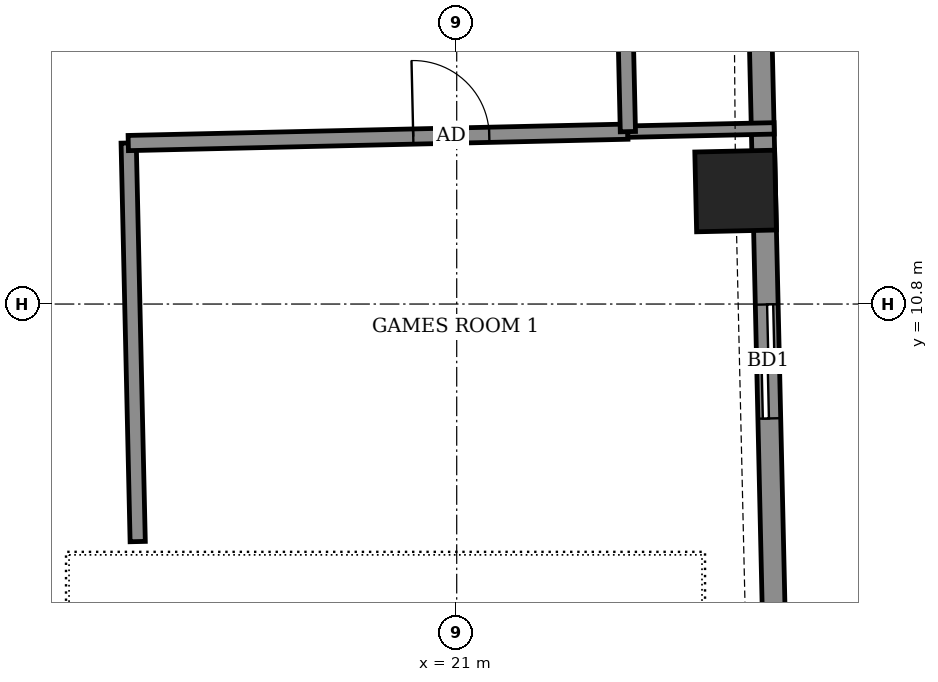
"""IFC4 building model, lengths in metres.
Left out: names, types, materials, properties, quantities, classifications, styles, units other than length and angle.
Written with IfcOpenShell. Run it as: python <this file> out.ifc"""

import sys

from ifc_helpers import new_model, si_unit, direction, frame, frame_2d, origin, origin_2d, place, context, subcontext, project, spatial, rectangle, extrude, element, fill, save


model = new_model("IFC4")
c1 = context("Model", 3, precision=1e-05, world=origin(), true_north=direction((0.0, 1.0)))
c2 = subcontext(c1, "Body", "Model", "MODEL_VIEW")
j1 = project(units=[si_unit("LENGTHUNIT", "METRE"), si_unit("PLANEANGLEUNIT", "RADIAN")], contexts=[c1])
p1 = place(None, origin())
s1 = spatial("IfcSite", under=j1, at=p1, CompositionType="ELEMENT")
p2 = place(p1, origin())
s2 = spatial("IfcBuilding", under=s1, at=p2, CompositionType="ELEMENT")
p3 = place(p2, frame((0.0, 0.0, 249.1)))
s3 = spatial("IfcBuildingStorey", under=s2, at=p3, CompositionType="ELEMENT", Elevation=249.1)
p4 = place(p3, frame((24.669, 12.287, -0.55), z_axis=(0.0, 0.0, 1.0), x_axis=(-0.022668680801, 0.999743032439, 0.0)))
e1 = element("IfcColumn", 1, at=p4, inside=s3, PredefinedType="COLUMN", context=c2, shape_type="SweptSolid", body=[
    extrude(rectangle(XDim=1.05, YDim=1.05, at=origin_2d()), origin(), (0.0, 0.0, 1.0), 3.6),
])
p5 = place(p3, frame((25.203, 5.31, 0.0), z_axis=(0.0, 0.0, 1.0), x_axis=(-0.022708061432, 0.999742138727, 0.0)))
e2 = element("IfcWall", 2, at=p5, inside=s3, PredefinedType="SOLIDWALL", context=c2, shape_type="SweptSolid", body=[
    extrude(rectangle(XDim=13.299, YDim=0.3, at=frame_2d((6.65, 0.0))), origin(), (0.0, 0.0, 1.0), 2.55),
])
p6 = place(p5, frame((3.986, 0.0, 0.0)))
e3 = element("IfcOpeningElement", 3, at=p6, cuts=e2, PredefinedType="OPENING", context=c2, shape_type="SweptSolid", body=[
    extrude(rectangle(XDim=1.5, YDim=2.4, at=frame_2d((0.75, 1.2))), frame((0.0, 0.16, 0.0), z_axis=(0.0, -1.0, 0.0), x_axis=(1.0, 0.0, 0.0)), (0.0, 0.0, 1.0), 0.32),
])
p7 = place(p5, frame((9.013, 0.0, 0.9)))
e4 = element("IfcOpeningElement", 4, at=p7, cuts=e2, PredefinedType="OPENING", context=c2, shape_type="SweptSolid", body=[
    extrude(rectangle(XDim=2.4, YDim=1.5, at=frame_2d((1.2, 0.75))), frame((0.0, 0.16, 0.0), z_axis=(0.0, -1.0, 0.0), x_axis=(1.0, 0.0, 0.0)), (0.0, 0.0, 1.0), 0.32),
])
p8 = place(p3, frame((16.803, 7.675, 0.0), z_axis=(0.0, 0.0, 1.0), x_axis=(-0.022667483124, 0.999743059595, 0.0)))
e5 = element("IfcWall", 5, at=p8, inside=s3, PredefinedType="PARTITIONING", context=c2, shape_type="SweptSolid", body=[
    extrude(rectangle(XDim=5.245, YDim=0.2, at=frame_2d((2.623, 0.0))), origin(), (0.0, 0.0, 1.0), 3.05),
])
p9 = place(p3, frame((16.679, 12.918, 0.0), z_axis=(0.0, 0.0, 1.0), x_axis=(0.999739125025, 0.022840356696, 0.0)))
e6 = element("IfcWall", 6, at=p9, inside=s3, PredefinedType="PARTITIONING", context=c2, shape_type="SweptSolid", body=[
    extrude(rectangle(XDim=6.574, YDim=0.2, at=frame_2d((3.287, 0.0))), origin(), (0.0, 0.0, 1.0), 3.05),
])
p10 = place(p9, frame((3.75, 0.0, 0.0)))
e7 = element("IfcOpeningElement", 7, at=p10, cuts=e6, PredefinedType="OPENING", context=c2, shape_type="SweptSolid", body=[
    extrude(rectangle(XDim=1.0, YDim=2.1, at=frame_2d((0.5, 1.05))), frame((0.0, 0.11, 0.0), z_axis=(0.0, -1.0, 0.0), x_axis=(1.0, 0.0, 0.0)), (0.0, 0.0, 1.0), 0.22),
])
p11 = place(p3, frame((23.251, 13.068, 0.0), z_axis=(0.0, 0.0, 1.0), x_axis=(0.999750982596, 0.022315304114, 0.0)))
e8 = element("IfcWall", 8, at=p11, inside=s3, PredefinedType="PARTITIONING", context=c2, shape_type="SweptSolid", body=[
    extrude(rectangle(XDim=1.926, YDim=0.15, at=frame_2d((0.963, 0.0))), origin(), (0.0, 0.0, 1.0), 2.55),
])
p12 = place(p3, frame((23.252, 13.068, 0.0), z_axis=(0.0, 0.0, 1.0), x_axis=(-0.022636322434, 0.999743765625, 0.0)))
e9 = element("IfcWall", 9, at=p12, inside=s3, PredefinedType="PARTITIONING", context=c2, shape_type="SweptSolid", body=[
    extrude(rectangle(XDim=1.499, YDim=0.2, at=frame_2d((0.75, 0.0))), origin(), (0.0, 0.0, 1.0), 3.05),
])
p13 = place(p3, frame((-27.652, 13.413, 0.0), z_axis=(0.0, 0.0, 1.0), x_axis=(0.999742864992, 0.022676064408, 0.0)))
e10 = element("IfcWall", 10, at=p13, inside=s3, PredefinedType="PARTITIONING", context=c2, shape_type="SweptSolid", body=[
    extrude(rectangle(XDim=50.882, YDim=0.2, at=frame_2d((25.441, 0.0))), origin(), (0.0, 0.0, 1.0), 3.05),
])
p14 = place(p13, frame((47.801, 0.0, 0.0)))
e11 = element("IfcOpeningElement", 11, at=p14, cuts=e10, PredefinedType="OPENING", context=c2, shape_type="SweptSolid", body=[
    extrude(rectangle(XDim=1.0, YDim=2.1, at=frame_2d((0.5, 1.05))), frame((0.0, 0.11, 0.0), z_axis=(0.0, -1.0, 0.0), x_axis=(1.0, 0.0, 0.0)), (0.0, 0.0, 1.0), 0.22),
])
p15 = place(p13, frame((43.425, 0.0, 0.0)))
e12 = element("IfcOpeningElement", 12, at=p15, cuts=e10, PredefinedType="OPENING", context=c2, shape_type="SweptSolid", body=[
    extrude(rectangle(XDim=0.9, YDim=2.1, at=frame_2d((0.45, 1.05))), frame((0.0, 0.11, 0.0), z_axis=(0.0, -1.0, 0.0), x_axis=(1.0, 0.0, 0.0)), (0.0, 0.0, 1.0), 0.22),
])
p16 = place(p13, frame((36.8, 0.0, 0.0)))
e13 = element("IfcOpeningElement", 13, at=p16, cuts=e10, PredefinedType="OPENING", context=c2, shape_type="SweptSolid", body=[
    extrude(rectangle(XDim=0.9, YDim=2.1, at=frame_2d((0.45, 1.05))), frame((0.0, 0.11, 0.0), z_axis=(0.0, -1.0, 0.0), x_axis=(1.0, 0.0, 0.0)), (0.0, 0.0, 1.0), 0.22),
])
p17 = place(p13, frame((34.975, 0.0, 0.0)))
e14 = element("IfcOpeningElement", 14, at=p17, cuts=e10, PredefinedType="OPENING", context=c2, shape_type="SweptSolid", body=[
    extrude(rectangle(XDim=0.9, YDim=2.1, at=frame_2d((0.45, 1.05))), frame((0.0, 0.11, 0.0), z_axis=(0.0, -1.0, 0.0), x_axis=(1.0, 0.0, 0.0)), (0.0, 0.0, 1.0), 0.22),
])
p18 = place(p13, frame((28.325, 0.0, 0.0)))
e15 = element("IfcOpeningElement", 15, at=p18, cuts=e10, PredefinedType="OPENING", context=c2, shape_type="SweptSolid", body=[
    extrude(rectangle(XDim=0.9, YDim=2.1, at=frame_2d((0.45, 1.05))), frame((0.0, 0.11, 0.0), z_axis=(0.0, -1.0, 0.0), x_axis=(1.0, 0.0, 0.0)), (0.0, 0.0, 1.0), 0.22),
])
p19 = place(p13, frame((26.475, 0.0, 0.0)))
e16 = element("IfcOpeningElement", 16, at=p19, cuts=e10, PredefinedType="OPENING", context=c2, shape_type="SweptSolid", body=[
    extrude(rectangle(XDim=0.9, YDim=2.1, at=frame_2d((0.45, 1.05))), frame((0.0, 0.11, 0.0), z_axis=(0.0, -1.0, 0.0), x_axis=(1.0, 0.0, 0.0)), (0.0, 0.0, 1.0), 0.22),
])
p20 = place(p13, frame((19.825, 0.0, 0.0)))
e17 = element("IfcOpeningElement", 17, at=p20, cuts=e10, PredefinedType="OPENING", context=c2, shape_type="SweptSolid", body=[
    extrude(rectangle(XDim=0.9, YDim=2.1, at=frame_2d((0.45, 1.05))), frame((0.0, 0.11, 0.0), z_axis=(0.0, -1.0, 0.0), x_axis=(1.0, 0.0, 0.0)), (0.0, 0.0, 1.0), 0.22),
])
p21 = place(p13, frame((17.975, 0.0, 0.0)))
e18 = element("IfcOpeningElement", 18, at=p21, cuts=e10, PredefinedType="OPENING", context=c2, shape_type="SweptSolid", body=[
    extrude(rectangle(XDim=0.9, YDim=2.1, at=frame_2d((0.45, 1.05))), frame((0.0, 0.11, 0.0), z_axis=(0.0, -1.0, 0.0), x_axis=(1.0, 0.0, 0.0)), (0.0, 0.0, 1.0), 0.22),
])
p22 = place(p13, frame((11.325, 0.0, 0.0)))
e19 = element("IfcOpeningElement", 19, at=p22, cuts=e10, PredefinedType="OPENING", context=c2, shape_type="SweptSolid", body=[
    extrude(rectangle(XDim=0.9, YDim=2.1, at=frame_2d((0.45, 1.05))), frame((0.0, 0.11, 0.0), z_axis=(0.0, -1.0, 0.0), x_axis=(1.0, 0.0, 0.0)), (0.0, 0.0, 1.0), 0.22),
])
p23 = place(p13, frame((9.475, 0.0, 0.0)))
e20 = element("IfcOpeningElement", 20, at=p23, cuts=e10, PredefinedType="OPENING", context=c2, shape_type="SweptSolid", body=[
    extrude(rectangle(XDim=0.9, YDim=2.1, at=frame_2d((0.45, 1.05))), frame((0.0, 0.11, 0.0), z_axis=(0.0, -1.0, 0.0), x_axis=(1.0, 0.0, 0.0)), (0.0, 0.0, 1.0), 0.22),
])
p24 = place(p13, frame((2.772, 0.0, 0.0)))
e21 = element("IfcOpeningElement", 21, at=p24, cuts=e10, PredefinedType="OPENING", context=c2, shape_type="SweptSolid", body=[
    extrude(rectangle(XDim=1.0, YDim=2.1, at=frame_2d((0.5, 1.05))), frame((0.0, 0.11, 0.0), z_axis=(0.0, -1.0, 0.0), x_axis=(1.0, 0.0, 0.0)), (0.0, 0.0, 1.0), 0.22),
])
p25 = place(p6, origin())
e22 = element("IfcDoor", 22, at=p25, inside=s3, OperationType="SLIDING_TO_LEFT", PredefinedType="DOOR", context=c2, shape_type="SweptSolid", body=[
    extrude(rectangle(XDim=1.5, YDim=2.4, at=frame_2d((0.75, 1.2))), frame((0.0, 0.025, 0.0), z_axis=(0.0, -1.0, 0.0), x_axis=(1.0, 0.0, 0.0)), (0.0, 0.0, 1.0), 0.05),
])
fill(e3, e22)
p26 = place(p10, origin())
e23 = element("IfcDoor", 23, at=p26, inside=s3, OperationType="SINGLE_SWING_RIGHT", PredefinedType="DOOR", context=c2, shape_type="SweptSolid", body=[
    extrude(rectangle(XDim=1.0, YDim=2.1, at=frame_2d((0.5, 1.05))), frame((0.0, 0.025, 0.0), z_axis=(0.0, -1.0, 0.0), x_axis=(1.0, 0.0, 0.0)), (0.0, 0.0, 1.0), 0.05),
])
fill(e7, e23)
save(model, sys.argv[1])
